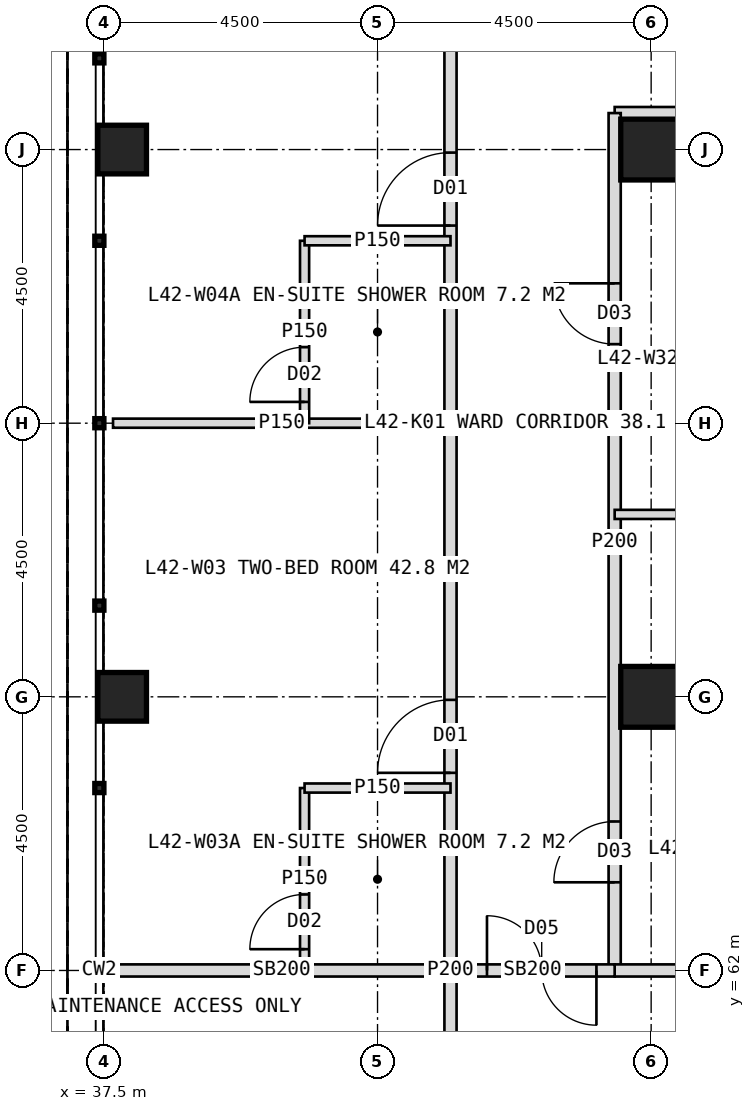
"""IFC4 building model, lengths in metres.
Left out: names, types, materials, properties, quantities, classifications, styles, units other than length and angle.
Written with IfcOpenShell. Run it as: python <this file> out.ifc"""

import sys

from ifc_helpers import new_model, si_unit, direction, frame, frame_2d, origin, origin_2d, place, context, subcontext, project, spatial, rectangle, hollow_rectangle, extrude, element, fill, save


model = new_model("IFC4")
c1 = context("Model", 3, precision=1e-05, world=origin(), true_north=direction((0.0, 1.0)))
c2 = subcontext(c1, "Body", "Model", "MODEL_VIEW")
j1 = project(units=[si_unit("LENGTHUNIT", "METRE"), si_unit("PLANEANGLEUNIT", "RADIAN")], contexts=[c1])
p1 = place(None, origin())
s1 = spatial("IfcSite", under=j1, at=p1, CompositionType="ELEMENT")
p2 = place(p1, origin())
s2 = spatial("IfcBuilding", under=s1, at=p2, CompositionType="ELEMENT")
p3 = place(p2, frame((0.0, 0.0, 177.0)))
s3 = spatial("IfcBuildingStorey", under=s2, at=p3, CompositionType="ELEMENT", Elevation=177.0)
for number, where, z_axis, x_axis in (
    (1, (46.5, 75.5, 0.0), (0.0, 0.0, 1.0), (1.0, 0.0, 0.0)),
    (2, (46.5, 66.5, 0.0), (0.0, 0.0, 1.0), (1.0, 0.0, 0.0)),
):
    element("IfcColumn", number, at=place(p3, frame(where, z_axis=z_axis, x_axis=x_axis)), inside=s3, PredefinedType="COLUMN", context=c2, shape_type="SweptSolid", body=[
        extrude(hollow_rectangle(XDim=1.0, YDim=1.0, WallThickness=0.1, at=origin_2d()), origin(), (0.0, 0.0, 1.0), 4.0),
    ])
for number, where, z_axis, x_axis in (
    (3, (37.8, 66.5, 0.0), (0.0, 0.0, 1.0), (1.0, 0.0, 0.0)),
    (4, (37.8, 75.5, 0.0), (0.0, 0.0, 1.0), (1.0, 0.0, 0.0)),
):
    element("IfcColumn", number, at=place(p3, frame(where, z_axis=z_axis, x_axis=x_axis)), inside=s3, PredefinedType="COLUMN", context=c2, shape_type="SweptSolid", body=[
        extrude(hollow_rectangle(XDim=0.8, YDim=0.8, WallThickness=0.08, at=origin_2d()), origin(), (0.0, 0.0, 1.0), 4.0),
    ])
p4 = place(p3, frame((45.9, 76.1, 0.0), z_axis=(0.0, 0.0, 1.0), x_axis=(1.0, 0.0, 0.0)))
e5 = element("IfcWall", 5, at=p4, inside=s3, PredefinedType="PARTITIONING", context=c2, shape_type="SweptSolid", body=[
    extrude(rectangle(XDim=5.1, YDim=0.2, at=frame_2d((2.55, 0.0))), origin(), (0.0, 0.0, 1.0), 3.75),
])
p5 = place(p3, frame((43.2, 62.0, 0.0), z_axis=(0.0, 0.0, 1.0), x_axis=(-1.0, 0.0, 0.0)))
e6 = element("IfcWall", 6, at=p5, inside=s3, PredefinedType="SOLIDWALL", context=c2, shape_type="SweptSolid", body=[
    extrude(rectangle(XDim=5.55, YDim=0.2, at=frame_2d((2.775, 0.0))), origin(), (0.0, 0.0, 1.0), 2.95),
])
p6 = place(p3, frame((43.2, 71.0, 0.0), z_axis=(0.0, 0.0, 1.0), x_axis=(-1.0, 0.0, 0.0)))
e7 = element("IfcWall", 7, at=p6, inside=s3, PredefinedType="PARTITIONING", context=c2, shape_type="SweptSolid", body=[
    extrude(rectangle(XDim=5.55, YDim=0.15, at=frame_2d((2.775, 0.0))), origin(), (0.0, 0.0, 1.0), 3.75),
])
p7 = place(p3, frame((43.2, 45.2, 0.0), z_axis=(0.0, 0.0, 1.0), x_axis=(0.0, 1.0, 0.0)))
e8 = element("IfcWall", 8, at=p7, inside=s3, PredefinedType="PARTITIONING", context=c2, shape_type="SweptSolid", body=[
    extrude(rectangle(XDim=33.6, YDim=0.2, at=frame_2d((16.8, 0.0))), origin(), (0.0, 0.0, 1.0), 3.75),
])
p8 = place(p7, frame((2.65, 0.0, 0.0)))
e9 = element("IfcOpeningElement", 9, at=p8, cuts=e8, PredefinedType="OPENING", context=c2, shape_type="SweptSolid", body=[
    extrude(rectangle(XDim=1.2, YDim=2.2, at=frame_2d((0.6, 1.1))), frame((0.0, 0.11, 0.0), z_axis=(0.0, -1.0, 0.0), x_axis=(1.0, 0.0, 0.0)), (0.0, 0.0, 1.0), 0.22),
])
p9 = place(p7, frame((13.45, 0.0, 0.0)))
e10 = element("IfcOpeningElement", 10, at=p9, cuts=e8, PredefinedType="OPENING", context=c2, shape_type="SweptSolid", body=[
    extrude(rectangle(XDim=1.2, YDim=2.2, at=frame_2d((0.6, 1.1))), frame((0.0, 0.11, 0.0), z_axis=(0.0, -1.0, 0.0), x_axis=(1.0, 0.0, 0.0)), (0.0, 0.0, 1.0), 0.22),
])
p10 = place(p7, frame((20.05, 0.0, 0.0)))
e11 = element("IfcOpeningElement", 11, at=p10, cuts=e8, PredefinedType="OPENING", context=c2, shape_type="SweptSolid", body=[
    extrude(rectangle(XDim=1.2, YDim=2.2, at=frame_2d((0.6, 1.1))), frame((0.0, 0.11, 0.0), z_axis=(0.0, -1.0, 0.0), x_axis=(1.0, 0.0, 0.0)), (0.0, 0.0, 1.0), 0.22),
])
p11 = place(p7, frame((29.05, 0.0, 0.0)))
e12 = element("IfcOpeningElement", 12, at=p11, cuts=e8, PredefinedType="OPENING", context=c2, shape_type="SweptSolid", body=[
    extrude(rectangle(XDim=1.2, YDim=2.2, at=frame_2d((0.6, 1.1))), frame((0.0, 0.11, 0.0), z_axis=(0.0, -1.0, 0.0), x_axis=(1.0, 0.0, 0.0)), (0.0, 0.0, 1.0), 0.22),
])
p12 = place(p3, frame((40.8, 62.0, 0.0), z_axis=(0.0, 0.0, 1.0), x_axis=(0.0, 1.0, 0.0)))
e13 = element("IfcWall", 13, at=p12, inside=s3, PredefinedType="PARTITIONING", context=c2, shape_type="SweptSolid", body=[
    extrude(rectangle(XDim=3.0, YDim=0.15, at=frame_2d((1.5, 0.0))), origin(), (0.0, 0.0, 1.0), 3.75),
])
p13 = place(p12, frame((0.35, 0.0, 0.0)))
e14 = element("IfcOpeningElement", 14, at=p13, cuts=e13, PredefinedType="OPENING", context=c2, shape_type="SweptSolid", body=[
    extrude(rectangle(XDim=0.9, YDim=2.1, at=frame_2d((0.45, 1.05))), frame((0.0, 0.085, 0.0), z_axis=(0.0, -1.0, 0.0), x_axis=(1.0, 0.0, 0.0)), (0.0, 0.0, 1.0), 0.17),
])
p14 = place(p3, frame((43.2, 65.0, 0.0), z_axis=(0.0, 0.0, 1.0), x_axis=(-1.0, 0.0, 0.0)))
e15 = element("IfcWall", 15, at=p14, inside=s3, PredefinedType="PARTITIONING", context=c2, shape_type="SweptSolid", body=[
    extrude(rectangle(XDim=2.4, YDim=0.15, at=frame_2d((1.2, 0.0))), origin(), (0.0, 0.0, 1.0), 3.75),
])
p15 = place(p3, frame((40.8, 71.0, 0.0), z_axis=(0.0, 0.0, 1.0), x_axis=(0.0, 1.0, 0.0)))
e16 = element("IfcWall", 16, at=p15, inside=s3, PredefinedType="PARTITIONING", context=c2, shape_type="SweptSolid", body=[
    extrude(rectangle(XDim=3.0, YDim=0.15, at=frame_2d((1.5, 0.0))), origin(), (0.0, 0.0, 1.0), 3.75),
])
p16 = place(p15, frame((0.35, 0.0, 0.0)))
e17 = element("IfcOpeningElement", 17, at=p16, cuts=e16, PredefinedType="OPENING", context=c2, shape_type="SweptSolid", body=[
    extrude(rectangle(XDim=0.9, YDim=2.1, at=frame_2d((0.45, 1.05))), frame((0.0, 0.085, 0.0), z_axis=(0.0, -1.0, 0.0), x_axis=(1.0, 0.0, 0.0)), (0.0, 0.0, 1.0), 0.17),
])
p17 = place(p3, frame((43.2, 74.0, 0.0), z_axis=(0.0, 0.0, 1.0), x_axis=(-1.0, 0.0, 0.0)))
e18 = element("IfcWall", 18, at=p17, inside=s3, PredefinedType="PARTITIONING", context=c2, shape_type="SweptSolid", body=[
    extrude(rectangle(XDim=2.4, YDim=0.15, at=frame_2d((1.2, 0.0))), origin(), (0.0, 0.0, 1.0), 3.75),
])
p18 = place(p3, frame((45.9, 62.0, 0.0), z_axis=(0.0, 0.0, 1.0), x_axis=(0.0, 1.0, 0.0)))
e19 = element("IfcWall", 19, at=p18, inside=s3, PredefinedType="PARTITIONING", context=c2, shape_type="SweptSolid", body=[
    extrude(rectangle(XDim=14.1, YDim=0.2, at=frame_2d((7.05, 0.0))), origin(), (0.0, 0.0, 1.0), 3.75),
])
p19 = place(p18, frame((1.45, 0.0, 0.0)))
e20 = element("IfcOpeningElement", 20, at=p19, cuts=e19, PredefinedType="OPENING", context=c2, shape_type="SweptSolid", body=[
    extrude(rectangle(XDim=1.0, YDim=2.1, at=frame_2d((0.5, 1.05))), frame((0.0, 0.11, 0.0), z_axis=(0.0, -1.0, 0.0), x_axis=(1.0, 0.0, 0.0)), (0.0, 0.0, 1.0), 0.22),
])
p20 = place(p18, frame((10.3, 0.0, 0.0)))
e21 = element("IfcOpeningElement", 21, at=p20, cuts=e19, PredefinedType="OPENING", context=c2, shape_type="SweptSolid", body=[
    extrude(rectangle(XDim=1.0, YDim=2.1, at=frame_2d((0.5, 1.05))), frame((0.0, 0.11, 0.0), z_axis=(0.0, -1.0, 0.0), x_axis=(1.0, 0.0, 0.0)), (0.0, 0.0, 1.0), 0.22),
])
p21 = place(p3, frame((51.0, 62.0, 0.0), z_axis=(0.0, 0.0, 1.0), x_axis=(-1.0, 0.0, 0.0)))
e22 = element("IfcWall", 22, at=p21, inside=s3, PredefinedType="SOLIDWALL", context=c2, shape_type="SweptSolid", body=[
    extrude(rectangle(XDim=5.1, YDim=0.2, at=frame_2d((2.55, 0.0))), origin(), (0.0, 0.0, 1.0), 2.95),
])
p22 = place(p3, frame((51.0, 69.5, 0.0), z_axis=(0.0, 0.0, 1.0), x_axis=(-1.0, 0.0, 0.0)))
e23 = element("IfcWall", 23, at=p22, inside=s3, PredefinedType="PARTITIONING", context=c2, shape_type="SweptSolid", body=[
    extrude(rectangle(XDim=5.1, YDim=0.15, at=frame_2d((2.55, 0.0))), origin(), (0.0, 0.0, 1.0), 3.75),
])
p23 = place(p3, frame((45.9, 62.0, 0.0), z_axis=(0.0, 0.0, 1.0), x_axis=(-1.0, 0.0, 0.0)))
e24 = element("IfcWall", 24, at=p23, inside=s3, PredefinedType="SOLIDWALL", context=c2, shape_type="SweptSolid", body=[
    extrude(rectangle(XDim=2.7, YDim=0.2, at=frame_2d((1.35, 0.0))), origin(), (0.0, 0.0, 1.0), 2.95),
])
p24 = place(p23, frame((0.3, 0.0, 0.0)))
e25 = element("IfcOpeningElement", 25, at=p24, cuts=e24, PredefinedType="OPENING", context=c2, shape_type="SweptSolid", body=[
    extrude(rectangle(XDim=1.8, YDim=2.2, at=frame_2d((0.9, 1.1))), frame((0.0, 0.11, 0.0), z_axis=(0.0, -1.0, 0.0), x_axis=(1.0, 0.0, 0.0)), (0.0, 0.0, 1.0), 0.22),
])
p25 = place(p10, origin())
e26 = element("IfcDoor", 26, at=p25, inside=s3, OperationType="SINGLE_SWING_LEFT", PredefinedType="DOOR", context=c2, shape_type="SweptSolid", body=[
    extrude(rectangle(XDim=1.2, YDim=2.2, at=frame_2d((0.6, 1.1))), frame((0.0, 0.025, 0.0), z_axis=(0.0, -1.0, 0.0), x_axis=(1.0, 0.0, 0.0)), (0.0, 0.0, 1.0), 0.05),
])
fill(e11, e26)
p26 = place(p13, origin())
e27 = element("IfcDoor", 27, at=p26, inside=s3, OperationType="SINGLE_SWING_LEFT", PredefinedType="DOOR", context=c2, shape_type="SweptSolid", body=[
    extrude(rectangle(XDim=0.9, YDim=2.1, at=frame_2d((0.45, 1.05))), frame((0.0, 0.025, 0.0), z_axis=(0.0, -1.0, 0.0), x_axis=(1.0, 0.0, 0.0)), (0.0, 0.0, 1.0), 0.05),
])
fill(e14, e27)
p27 = place(p11, origin())
e28 = element("IfcDoor", 28, at=p27, inside=s3, OperationType="SINGLE_SWING_LEFT", PredefinedType="DOOR", context=c2, shape_type="SweptSolid", body=[
    extrude(rectangle(XDim=1.2, YDim=2.2, at=frame_2d((0.6, 1.1))), frame((0.0, 0.025, 0.0), z_axis=(0.0, -1.0, 0.0), x_axis=(1.0, 0.0, 0.0)), (0.0, 0.0, 1.0), 0.05),
])
fill(e12, e28)
p28 = place(p16, origin())
e29 = element("IfcDoor", 29, at=p28, inside=s3, OperationType="SINGLE_SWING_LEFT", PredefinedType="DOOR", context=c2, shape_type="SweptSolid", body=[
    extrude(rectangle(XDim=0.9, YDim=2.1, at=frame_2d((0.45, 1.05))), frame((0.0, 0.025, 0.0), z_axis=(0.0, -1.0, 0.0), x_axis=(1.0, 0.0, 0.0)), (0.0, 0.0, 1.0), 0.05),
])
fill(e17, e29)
p29 = place(p19, origin())
e30 = element("IfcDoor", 30, at=p29, inside=s3, OperationType="SINGLE_SWING_LEFT", PredefinedType="DOOR", context=c2, shape_type="SweptSolid", body=[
    extrude(rectangle(XDim=1.0, YDim=2.1, at=frame_2d((0.5, 1.05))), frame((0.0, 0.025, 0.0), z_axis=(0.0, -1.0, 0.0), x_axis=(1.0, 0.0, 0.0)), (0.0, 0.0, 1.0), 0.05),
])
fill(e20, e30)
p30 = place(p20, origin())
e31 = element("IfcDoor", 31, at=p30, inside=s3, OperationType="SINGLE_SWING_RIGHT", PredefinedType="DOOR", context=c2, shape_type="SweptSolid", body=[
    extrude(rectangle(XDim=1.0, YDim=2.1, at=frame_2d((0.5, 1.05))), frame((0.0, 0.025, 0.0), z_axis=(0.0, -1.0, 0.0), x_axis=(1.0, 0.0, 0.0)), (0.0, 0.0, 1.0), 0.05),
])
fill(e21, e31)
p31 = place(p24, origin())
e32 = element("IfcDoor", 32, at=p31, inside=s3, OperationType="DOUBLE_DOOR_DOUBLE_SWING", PredefinedType="DOOR", context=c2, shape_type="SweptSolid", body=[
    extrude(rectangle(XDim=1.8, YDim=2.2, at=frame_2d((0.9, 1.1))), frame((0.0, 0.025, 0.0), z_axis=(0.0, -1.0, 0.0), x_axis=(1.0, 0.0, 0.0)), (0.0, 0.0, 1.0), 0.05),
])
fill(e25, e32)
save(model, sys.argv[1])
